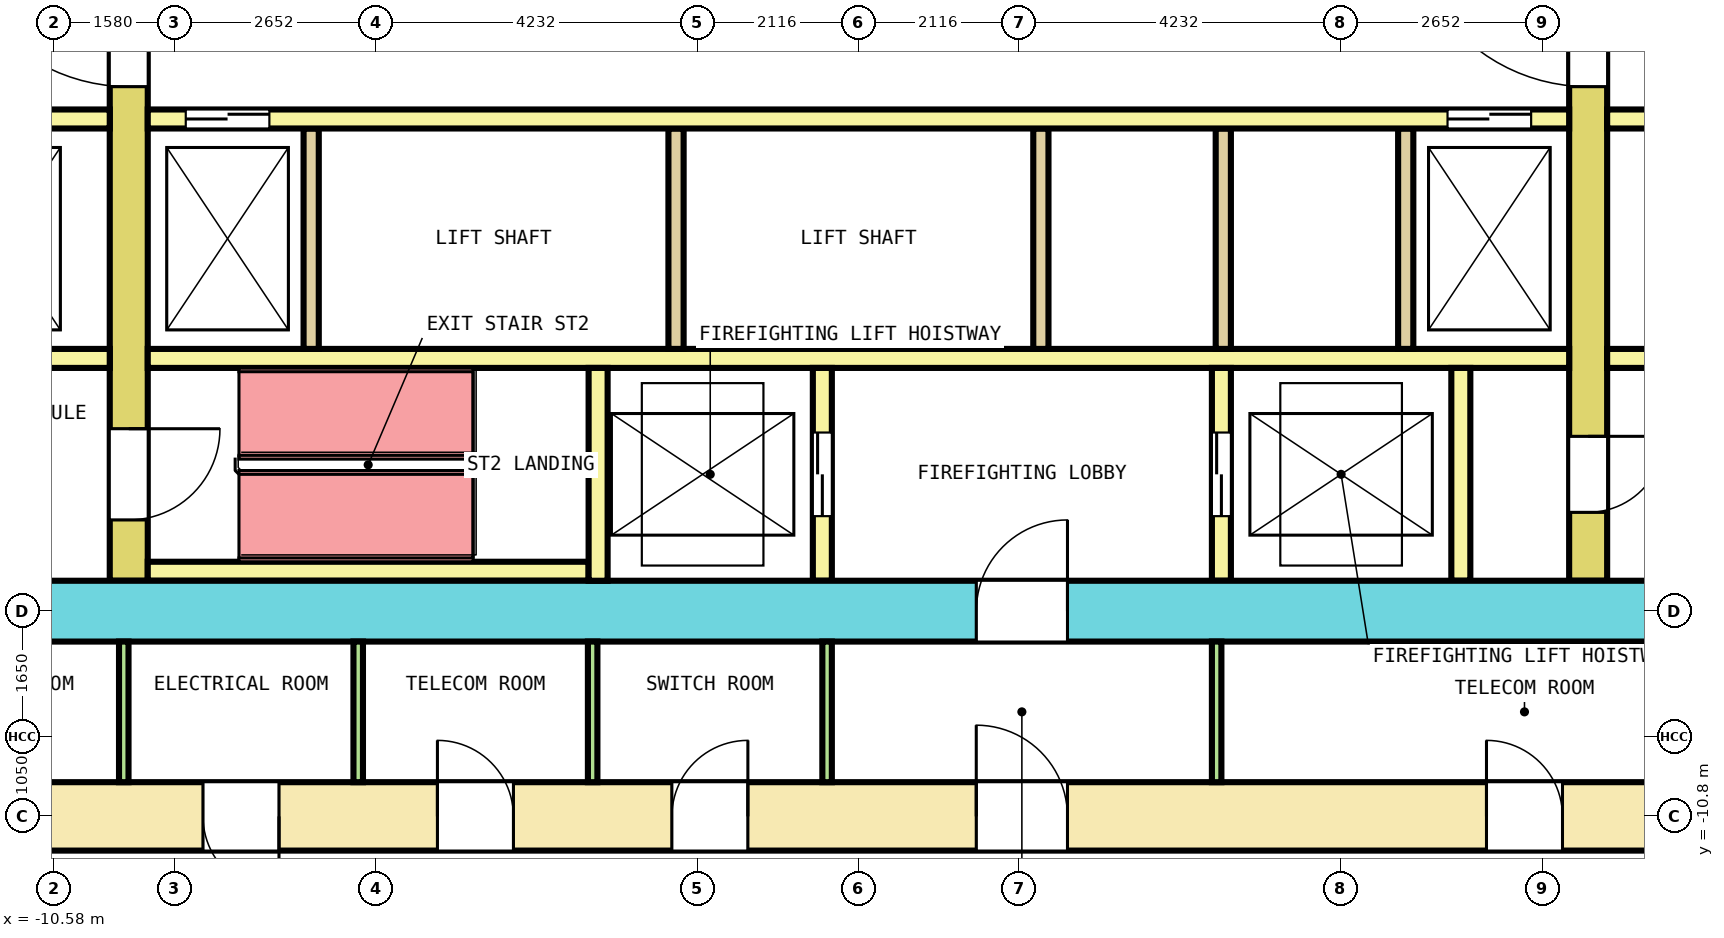
"""IFC4 building model, lengths in metres.
Left out: names, types, materials, properties, quantities, classifications, styles, units other than length and angle.
Written with IfcOpenShell. Run it as: python <this file> out.ifc"""

import sys

from ifc_helpers import new_model, si_unit, direction, frame, frame_2d, origin, place, context, subcontext, project, spatial, rectangle, extrude, element, fill, save


model = new_model("IFC4")
c1 = context("Model", 3, precision=1e-05, world=origin(), true_north=direction((0.0, 1.0)))
c2 = subcontext(c1, "Body", "Model", "MODEL_VIEW")
j1 = project(units=[si_unit("LENGTHUNIT", "METRE"), si_unit("PLANEANGLEUNIT", "RADIAN")], contexts=[c1])
p1 = place(None, origin())
s1 = spatial("IfcSite", under=j1, at=p1, CompositionType="ELEMENT")
p2 = place(p1, origin())
s2 = spatial("IfcBuilding", under=s1, at=p2, CompositionType="ELEMENT")
p3 = place(p2, frame((0.0, 0.0, 41.0)))
s3 = spatial("IfcBuildingStorey", under=s2, at=p3, CompositionType="ELEMENT", Elevation=41.0)
p4 = place(p3, frame((-13.65, -10.8, 0.0), z_axis=(0.0, 0.0, 1.0), x_axis=(1.0, 0.0, 0.0)))
e1 = element("IfcWall", 1, at=p4, inside=s3, PredefinedType="SHEAR", context=c2, shape_type="SweptSolid", body=[
    extrude(rectangle(XDim=27.3, YDim=0.9, at=frame_2d((13.65, 0.0))), origin(), (0.0, 0.0, 1.0), 4.1),
])
p5 = place(p4, frame((1.911, 0.0, 0.0)))
e2 = element("IfcOpeningElement", 2, at=p5, cuts=e1, PredefinedType="OPENING", context=c2, shape_type="SweptSolid", body=[
    extrude(rectangle(XDim=1.0, YDim=2.1, at=frame_2d((0.5, 1.05))), frame((0.0, 0.46, 0.0), z_axis=(0.0, -1.0, 0.0), x_axis=(1.0, 0.0, 0.0)), (0.0, 0.0, 1.0), 0.92),
])
p6 = place(p4, frame((5.027, 0.0, 0.0)))
e3 = element("IfcOpeningElement", 3, at=p6, cuts=e1, PredefinedType="OPENING", context=c2, shape_type="SweptSolid", body=[
    extrude(rectangle(XDim=1.0, YDim=2.1, at=frame_2d((0.5, 1.05))), frame((0.0, 0.46, 0.0), z_axis=(0.0, -1.0, 0.0), x_axis=(1.0, 0.0, 0.0)), (0.0, 0.0, 1.0), 0.92),
])
p7 = place(p4, frame((8.111, 0.0, 0.0)))
e4 = element("IfcOpeningElement", 4, at=p7, cuts=e1, PredefinedType="OPENING", context=c2, shape_type="SweptSolid", body=[
    extrude(rectangle(XDim=1.0, YDim=2.1, at=frame_2d((0.5, 1.05))), frame((0.0, 0.46, 0.0), z_axis=(0.0, -1.0, 0.0), x_axis=(1.0, 0.0, 0.0)), (0.0, 0.0, 1.0), 0.92),
])
p8 = place(p4, frame((11.195, 0.0, 0.0)))
e5 = element("IfcOpeningElement", 5, at=p8, cuts=e1, PredefinedType="OPENING", context=c2, shape_type="SweptSolid", body=[
    extrude(rectangle(XDim=1.0, YDim=2.1, at=frame_2d((0.5, 1.05))), frame((0.0, 0.46, 0.0), z_axis=(0.0, -1.0, 0.0), x_axis=(1.0, 0.0, 0.0)), (0.0, 0.0, 1.0), 0.92),
])
p9 = place(p4, frame((21.913, 0.0, 0.0)))
e6 = element("IfcOpeningElement", 6, at=p9, cuts=e1, PredefinedType="OPENING", context=c2, shape_type="SweptSolid", body=[
    extrude(rectangle(XDim=1.0, YDim=2.1, at=frame_2d((0.5, 1.05))), frame((0.0, 0.46, 0.0), z_axis=(0.0, -1.0, 0.0), x_axis=(1.0, 0.0, 0.0)), (0.0, 0.0, 1.0), 0.92),
])
p10 = place(p4, frame((15.2, 0.0, 0.0)))
e7 = element("IfcOpeningElement", 7, at=p10, cuts=e1, PredefinedType="OPENING", context=c2, shape_type="SweptSolid", body=[
    extrude(rectangle(XDim=1.2, YDim=2.1, at=frame_2d((0.6, 1.05))), frame((0.0, 0.46, 0.0), z_axis=(0.0, -1.0, 0.0), x_axis=(1.0, 0.0, 0.0)), (0.0, 0.0, 1.0), 0.92),
])
p11 = place(p3, frame((-12.75, -8.1, 0.0), z_axis=(0.0, 0.0, 1.0), x_axis=(1.0, 0.0, 0.0)))
e8 = element("IfcWall", 8, at=p11, inside=s3, PredefinedType="SHEAR", context=c2, shape_type="SweptSolid", body=[
    extrude(rectangle(XDim=25.5, YDim=0.8, at=frame_2d((12.75, 0.0))), origin(), (0.0, 0.0, 1.0), 4.1),
])
p12 = place(p11, frame((14.3, 0.0, 0.0)))
e9 = element("IfcOpeningElement", 9, at=p12, cuts=e8, PredefinedType="OPENING", context=c2, shape_type="SweptSolid", body=[
    extrude(rectangle(XDim=1.2, YDim=2.1, at=frame_2d((0.6, 1.05))), frame((0.0, 0.41, 0.0), z_axis=(0.0, -1.0, 0.0), x_axis=(1.0, 0.0, 0.0)), (0.0, 0.0, 1.0), 0.82),
])
p13 = place(p3, frame((-9.6, -7.7, 0.0), z_axis=(0.0, 0.0, 1.0), x_axis=(0.0, 1.0, 0.0)))
e10 = element("IfcWall", 10, at=p13, inside=s3, PredefinedType="SHEAR", context=c2, shape_type="SweptSolid", body=[
    extrude(rectangle(XDim=15.4, YDim=0.5, at=frame_2d((7.7, 0.0))), origin(), (0.0, 0.0, 1.0), 4.1),
])
p14 = place(p13, frame((6.5, 0.0, 0.0)))
e11 = element("IfcOpeningElement", 11, at=p14, cuts=e10, PredefinedType="OPENING", context=c2, shape_type="SweptSolid", body=[
    extrude(rectangle(XDim=2.4, YDim=2.1, at=frame_2d((1.2, 1.05))), frame((0.0, 0.26, 0.0), z_axis=(0.0, -1.0, 0.0), x_axis=(1.0, 0.0, 0.0)), (0.0, 0.0, 1.0), 0.52),
])
p15 = place(p13, frame((13.4, 0.0, 0.0)))
e12 = element("IfcOpeningElement", 12, at=p15, cuts=e10, PredefinedType="OPENING", context=c2, shape_type="SweptSolid", body=[
    extrude(rectangle(XDim=1.2, YDim=2.1, at=frame_2d((0.6, 1.05))), frame((0.0, 0.26, 0.0), z_axis=(0.0, -1.0, 0.0), x_axis=(1.0, 0.0, 0.0)), (0.0, 0.0, 1.0), 0.52),
])
p16 = place(p13, frame((0.8, 0.0, 0.0)))
e13 = element("IfcOpeningElement", 13, at=p16, cuts=e10, PredefinedType="OPENING", context=c2, shape_type="SweptSolid", body=[
    extrude(rectangle(XDim=1.2, YDim=2.1, at=frame_2d((0.6, 1.05))), frame((0.0, 0.26, 0.0), z_axis=(0.0, -1.0, 0.0), x_axis=(1.0, 0.0, 0.0)), (0.0, 0.0, 1.0), 0.52),
])
p17 = place(p3, frame((9.6, -7.7, 0.0), z_axis=(0.0, 0.0, 1.0), x_axis=(0.0, 1.0, 0.0)))
e14 = element("IfcWall", 14, at=p17, inside=s3, PredefinedType="SHEAR", context=c2, shape_type="SweptSolid", body=[
    extrude(rectangle(XDim=15.4, YDim=0.5, at=frame_2d((7.7, 0.0))), origin(), (0.0, 0.0, 1.0), 4.1),
])
p18 = place(p17, frame((6.5, 0.0, 0.0)))
e15 = element("IfcOpeningElement", 15, at=p18, cuts=e14, PredefinedType="OPENING", context=c2, shape_type="SweptSolid", body=[
    extrude(rectangle(XDim=2.4, YDim=2.1, at=frame_2d((1.2, 1.05))), frame((0.0, 0.26, 0.0), z_axis=(0.0, -1.0, 0.0), x_axis=(1.0, 0.0, 0.0)), (0.0, 0.0, 1.0), 0.52),
])
p19 = place(p17, frame((13.4, 0.0, 0.0)))
e16 = element("IfcOpeningElement", 16, at=p19, cuts=e14, PredefinedType="OPENING", context=c2, shape_type="SweptSolid", body=[
    extrude(rectangle(XDim=1.2, YDim=2.1, at=frame_2d((0.6, 1.05))), frame((0.0, 0.26, 0.0), z_axis=(0.0, -1.0, 0.0), x_axis=(1.0, 0.0, 0.0)), (0.0, 0.0, 1.0), 0.52),
])
p20 = place(p17, frame((0.9, 0.0, 0.0)))
e17 = element("IfcOpeningElement", 17, at=p20, cuts=e14, PredefinedType="OPENING", context=c2, shape_type="SweptSolid", body=[
    extrude(rectangle(XDim=1.0, YDim=2.1, at=frame_2d((0.5, 1.05))), frame((0.0, 0.26, 0.0), z_axis=(0.0, -1.0, 0.0), x_axis=(1.0, 0.0, 0.0)), (0.0, 0.0, 1.0), 0.52),
])
p21 = place(p3, frame((-12.75, -1.625, 0.0), z_axis=(0.0, 0.0, 1.0), x_axis=(1.0, 0.0, 0.0)))
e18 = element("IfcWall", 18, at=p21, inside=s3, PredefinedType="SOLIDWALL", context=c2, shape_type="SweptSolid", body=[
    extrude(rectangle(XDim=2.9, YDim=0.25, at=frame_2d((1.45, 0.0))), origin(), (0.0, 0.0, 1.0), 4.1),
])
p22 = place(p21, frame((0.9, 0.0, 0.0)))
e19 = element("IfcOpeningElement", 19, at=p22, cuts=e18, PredefinedType="OPENING", context=c2, shape_type="SweptSolid", body=[
    extrude(rectangle(XDim=1.1, YDim=2.1, at=frame_2d((0.55, 1.05))), frame((0.0, 0.135, 0.0), z_axis=(0.0, -1.0, 0.0), x_axis=(1.0, 0.0, 0.0)), (0.0, 0.0, 1.0), 0.27),
])
p23 = place(p3, frame((-9.35, -1.625, 0.0), z_axis=(0.0, 0.0, 1.0), x_axis=(1.0, 0.0, 0.0)))
e20 = element("IfcWall", 20, at=p23, inside=s3, PredefinedType="SOLIDWALL", context=c2, shape_type="SweptSolid", body=[
    extrude(rectangle(XDim=18.7, YDim=0.25, at=frame_2d((9.35, 0.0))), origin(), (0.0, 0.0, 1.0), 4.1),
])
p24 = place(p23, frame((0.5, 0.0, 0.0)))
e21 = element("IfcOpeningElement", 21, at=p24, cuts=e20, PredefinedType="OPENING", context=c2, shape_type="SweptSolid", body=[
    extrude(rectangle(XDim=1.1, YDim=2.1, at=frame_2d((0.55, 1.05))), frame((0.0, 0.135, 0.0), z_axis=(0.0, -1.0, 0.0), x_axis=(1.0, 0.0, 0.0)), (0.0, 0.0, 1.0), 0.27),
])
p25 = place(p23, frame((17.1, 0.0, 0.0)))
e22 = element("IfcOpeningElement", 22, at=p25, cuts=e20, PredefinedType="OPENING", context=c2, shape_type="SweptSolid", body=[
    extrude(rectangle(XDim=1.1, YDim=2.1, at=frame_2d((0.55, 1.05))), frame((0.0, 0.135, 0.0), z_axis=(0.0, -1.0, 0.0), x_axis=(1.0, 0.0, 0.0)), (0.0, 0.0, 1.0), 0.27),
])
p26 = place(p3, frame((9.85, -1.625, 0.0), z_axis=(0.0, 0.0, 1.0), x_axis=(1.0, 0.0, 0.0)))
e23 = element("IfcWall", 23, at=p26, inside=s3, PredefinedType="SOLIDWALL", context=c2, shape_type="SweptSolid", body=[
    extrude(rectangle(XDim=2.9, YDim=0.25, at=frame_2d((1.45, 0.0))), origin(), (0.0, 0.0, 1.0), 4.1),
])
p27 = place(p26, frame((0.9, 0.0, 0.0)))
e24 = element("IfcOpeningElement", 24, at=p27, cuts=e23, PredefinedType="OPENING", context=c2, shape_type="SweptSolid", body=[
    extrude(rectangle(XDim=1.1, YDim=2.1, at=frame_2d((0.55, 1.05))), frame((0.0, 0.135, 0.0), z_axis=(0.0, -1.0, 0.0), x_axis=(1.0, 0.0, 0.0)), (0.0, 0.0, 1.0), 0.27),
])
p28 = place(p3, frame((-12.75, -4.775, 0.0), z_axis=(0.0, 0.0, 1.0), x_axis=(1.0, 0.0, 0.0)))
e25 = element("IfcWall", 25, at=p28, inside=s3, PredefinedType="SOLIDWALL", context=c2, shape_type="SweptSolid", body=[
    extrude(rectangle(XDim=2.9, YDim=0.25, at=frame_2d((1.45, 0.0))), origin(), (0.0, 0.0, 1.0), 4.1),
])
p29 = place(p3, frame((-9.35, -4.775, 0.0), z_axis=(0.0, 0.0, 1.0), x_axis=(1.0, 0.0, 0.0)))
e26 = element("IfcWall", 26, at=p29, inside=s3, PredefinedType="SOLIDWALL", context=c2, shape_type="SweptSolid", body=[
    extrude(rectangle(XDim=18.7, YDim=0.25, at=frame_2d((9.35, 0.0))), origin(), (0.0, 0.0, 1.0), 4.1),
])
p30 = place(p3, frame((9.85, -4.775, 0.0), z_axis=(0.0, 0.0, 1.0), x_axis=(1.0, 0.0, 0.0)))
e27 = element("IfcWall", 27, at=p30, inside=s3, PredefinedType="SOLIDWALL", context=c2, shape_type="SweptSolid", body=[
    extrude(rectangle(XDim=2.9, YDim=0.25, at=frame_2d((1.45, 0.0))), origin(), (0.0, 0.0, 1.0), 4.1),
])
for number, where, z_axis, x_axis in (
    (28, (-7.2, -4.65, 0.0), (0.0, 0.0, 1.0), (0.0, 1.0, 0.0)),
    (29, (-2.4, -4.65, 0.0), (0.0, 0.0, 1.0), (0.0, 1.0, 0.0)),
    (30, (2.4, -4.65, 0.0), (0.0, 0.0, 1.0), (0.0, 1.0, 0.0)),
    (31, (4.8, -4.65, 0.0), (0.0, 0.0, 1.0), (0.0, 1.0, 0.0)),
    (32, (7.2, -4.65, 0.0), (0.0, 0.0, 1.0), (0.0, 1.0, 0.0)),
):
    element("IfcWall", number, at=place(p3, frame(where, z_axis=z_axis, x_axis=x_axis)), inside=s3, PredefinedType="SOLIDWALL", context=c2, shape_type="SweptSolid", body=[
        extrude(rectangle(XDim=2.9, YDim=0.2, at=frame_2d((1.45, 0.0))), origin(), (0.0, 0.0, 1.0), 4.1),
    ])
p31 = place(p3, frame((-9.35, -7.575, 0.0), z_axis=(0.0, 0.0, 1.0), x_axis=(1.0, 0.0, 0.0)))
e33 = element("IfcWall", 33, at=p31, inside=s3, PredefinedType="SOLIDWALL", context=c2, shape_type="SweptSolid", body=[
    extrude(rectangle(XDim=5.8, YDim=0.25, at=frame_2d((2.9, 0.0))), origin(), (0.0, 0.0, 1.0), 4.1),
])
p32 = place(p3, frame((-3.425, -7.7, 0.0), z_axis=(0.0, 0.0, 1.0), x_axis=(0.0, 1.0, 0.0)))
e34 = element("IfcWall", 34, at=p32, inside=s3, PredefinedType="SOLIDWALL", context=c2, shape_type="SweptSolid", body=[
    extrude(rectangle(XDim=2.8, YDim=0.25, at=frame_2d((1.4, 0.0))), origin(), (0.0, 0.0, 1.0), 4.1),
])
p33 = place(p3, frame((-0.475, -7.7, 0.0), z_axis=(0.0, 0.0, 1.0), x_axis=(0.0, 1.0, 0.0)))
e35 = element("IfcWall", 35, at=p33, inside=s3, PredefinedType="SOLIDWALL", context=c2, shape_type="SweptSolid", body=[
    extrude(rectangle(XDim=2.8, YDim=0.25, at=frame_2d((1.4, 0.0))), origin(), (0.0, 0.0, 1.0), 4.1),
])
p34 = place(p33, frame((0.85, 0.0, 0.0)))
e36 = element("IfcOpeningElement", 36, at=p34, cuts=e35, PredefinedType="OPENING", context=c2, shape_type="SweptSolid", body=[
    extrude(rectangle(XDim=1.1, YDim=2.1, at=frame_2d((0.55, 1.05))), frame((0.0, 0.135, 0.0), z_axis=(0.0, -1.0, 0.0), x_axis=(1.0, 0.0, 0.0)), (0.0, 0.0, 1.0), 0.27),
])
p35 = place(p3, frame((4.775, -7.7, 0.0), z_axis=(0.0, 0.0, 1.0), x_axis=(0.0, 1.0, 0.0)))
e37 = element("IfcWall", 37, at=p35, inside=s3, PredefinedType="SOLIDWALL", context=c2, shape_type="SweptSolid", body=[
    extrude(rectangle(XDim=2.8, YDim=0.25, at=frame_2d((1.4, 0.0))), origin(), (0.0, 0.0, 1.0), 4.1),
])
p36 = place(p35, frame((0.85, 0.0, 0.0)))
e38 = element("IfcOpeningElement", 38, at=p36, cuts=e37, PredefinedType="OPENING", context=c2, shape_type="SweptSolid", body=[
    extrude(rectangle(XDim=1.1, YDim=2.1, at=frame_2d((0.55, 1.05))), frame((0.0, 0.135, 0.0), z_axis=(0.0, -1.0, 0.0), x_axis=(1.0, 0.0, 0.0)), (0.0, 0.0, 1.0), 0.27),
])
p37 = place(p3, frame((7.925, -7.7, 0.0), z_axis=(0.0, 0.0, 1.0), x_axis=(0.0, 1.0, 0.0)))
e39 = element("IfcWall", 39, at=p37, inside=s3, PredefinedType="SOLIDWALL", context=c2, shape_type="SweptSolid", body=[
    extrude(rectangle(XDim=2.8, YDim=0.25, at=frame_2d((1.4, 0.0))), origin(), (0.0, 0.0, 1.0), 4.1),
])
for number, where, z_axis, x_axis in (
    (40, (-9.666, -10.35, 0.0), (0.0, 0.0, 1.0), (0.0, 1.0, 0.0)),
    (41, (-6.581, -10.35, 0.0), (0.0, 0.0, 1.0), (0.0, 1.0, 0.0)),
    (42, (-3.497, -10.35, 0.0), (0.0, 0.0, 1.0), (0.0, 1.0, 0.0)),
    (43, (-0.413, -10.35, 0.0), (0.0, 0.0, 1.0), (0.0, 1.0, 0.0)),
    (44, (4.712, -10.35, 0.0), (0.0, 0.0, 1.0), (0.0, 1.0, 0.0)),
):
    element("IfcWall", number, at=place(p3, frame(where, z_axis=z_axis, x_axis=x_axis)), inside=s3, PredefinedType="PARTITIONING", context=c2, shape_type="SweptSolid", body=[
        extrude(rectangle(XDim=1.85, YDim=0.125, at=frame_2d((0.925, 0.0))), origin(), (0.0, 0.0, 1.0), 4.1),
    ])
p38 = place(p24, origin())
e45 = element("IfcDoor", 45, at=p38, inside=s3, OperationType="DOUBLE_DOOR_SLIDING", PredefinedType="DOOR", context=c2, shape_type="SweptSolid", body=[
    extrude(rectangle(XDim=1.1, YDim=2.1, at=frame_2d((0.55, 1.05))), frame((0.0, 0.075, 0.0), z_axis=(0.0, -1.0, 0.0), x_axis=(1.0, 0.0, 0.0)), (0.0, 0.0, 1.0), 0.15),
])
fill(e21, e45)
p39 = place(p25, origin())
e46 = element("IfcDoor", 46, at=p39, inside=s3, OperationType="DOUBLE_DOOR_SLIDING", PredefinedType="DOOR", context=c2, shape_type="SweptSolid", body=[
    extrude(rectangle(XDim=1.1, YDim=2.1, at=frame_2d((0.55, 1.05))), frame((0.0, 0.075, 0.0), z_axis=(0.0, -1.0, 0.0), x_axis=(1.0, 0.0, 0.0)), (0.0, 0.0, 1.0), 0.15),
])
fill(e22, e46)
p40 = place(p34, origin())
e47 = element("IfcDoor", 47, at=p40, inside=s3, OperationType="DOUBLE_DOOR_SLIDING", PredefinedType="DOOR", context=c2, shape_type="SweptSolid", body=[
    extrude(rectangle(XDim=1.1, YDim=2.1, at=frame_2d((0.55, 1.05))), frame((0.0, 0.075, 0.0), z_axis=(0.0, -1.0, 0.0), x_axis=(1.0, 0.0, 0.0)), (0.0, 0.0, 1.0), 0.15),
])
fill(e36, e47)
p41 = place(p36, origin())
e48 = element("IfcDoor", 48, at=p41, inside=s3, OperationType="DOUBLE_DOOR_SLIDING", PredefinedType="DOOR", context=c2, shape_type="SweptSolid", body=[
    extrude(rectangle(XDim=1.1, YDim=2.1, at=frame_2d((0.55, 1.05))), frame((0.0, 0.075, 0.0), z_axis=(0.0, -1.0, 0.0), x_axis=(1.0, 0.0, 0.0)), (0.0, 0.0, 1.0), 0.15),
])
fill(e38, e48)
p42 = place(p14, origin())
e49 = element("IfcDoor", 49, at=p42, inside=s3, OperationType="DOUBLE_DOOR_SINGLE_SWING", PredefinedType="DOOR", context=c2, shape_type="SweptSolid", body=[
    extrude(rectangle(XDim=2.4, YDim=2.1, at=frame_2d((1.2, 1.05))), frame((0.0, 0.2, 0.0), z_axis=(0.0, -1.0, 0.0), x_axis=(1.0, 0.0, 0.0)), (0.0, 0.0, 1.0), 0.4),
])
fill(e11, e49)
p43 = place(p18, origin())
e50 = element("IfcDoor", 50, at=p43, inside=s3, OperationType="DOUBLE_DOOR_SINGLE_SWING", PredefinedType="DOOR", context=c2, shape_type="SweptSolid", body=[
    extrude(rectangle(XDim=2.4, YDim=2.1, at=frame_2d((1.2, 1.05))), frame((0.0, 0.2, 0.0), z_axis=(0.0, -1.0, 0.0), x_axis=(1.0, 0.0, 0.0)), (0.0, 0.0, 1.0), 0.4),
])
fill(e15, e50)
p44 = place(p16, origin())
e51 = element("IfcDoor", 51, at=p44, inside=s3, OperationType="SINGLE_SWING_RIGHT", PredefinedType="DOOR", context=c2, shape_type="SweptSolid", body=[
    extrude(rectangle(XDim=1.2, YDim=2.1, at=frame_2d((0.6, 1.05))), frame((0.0, 0.2, 0.0), z_axis=(0.0, -1.0, 0.0), x_axis=(1.0, 0.0, 0.0)), (0.0, 0.0, 1.0), 0.4),
])
fill(e13, e51)
p45 = place(p12, origin())
e52 = element("IfcDoor", 52, at=p45, inside=s3, OperationType="SINGLE_SWING_RIGHT", PredefinedType="DOOR", context=c2, shape_type="SweptSolid", body=[
    extrude(rectangle(XDim=1.2, YDim=2.1, at=frame_2d((0.6, 1.05))), frame((0.0, 0.3, 0.0), z_axis=(0.0, -1.0, 0.0), x_axis=(1.0, 0.0, 0.0)), (0.0, 0.0, 1.0), 0.6),
])
fill(e9, e52)
p46 = place(p20, origin())
e53 = element("IfcDoor", 53, at=p46, inside=s3, OperationType="SINGLE_SWING_RIGHT", PredefinedType="DOOR", context=c2, shape_type="SweptSolid", body=[
    extrude(rectangle(XDim=1.0, YDim=2.1, at=frame_2d((0.5, 1.05))), frame((0.0, 0.2, 0.0), z_axis=(0.0, -1.0, 0.0), x_axis=(1.0, 0.0, 0.0)), (0.0, 0.0, 1.0), 0.4),
])
fill(e17, e53)
p47 = place(p6, origin())
e54 = element("IfcDoor", 54, at=p47, inside=s3, OperationType="SINGLE_SWING_RIGHT", PredefinedType="DOOR", context=c2, shape_type="SweptSolid", body=[
    extrude(rectangle(XDim=1.0, YDim=2.1, at=frame_2d((0.5, 1.05))), frame((0.0, 0.3, 0.0), z_axis=(0.0, -1.0, 0.0), x_axis=(1.0, 0.0, 0.0)), (0.0, 0.0, 1.0), 0.6),
])
fill(e3, e54)
p48 = place(p7, origin())
e55 = element("IfcDoor", 55, at=p48, inside=s3, OperationType="SINGLE_SWING_LEFT", PredefinedType="DOOR", context=c2, shape_type="SweptSolid", body=[
    extrude(rectangle(XDim=1.0, YDim=2.1, at=frame_2d((0.5, 1.05))), frame((0.0, 0.3, 0.0), z_axis=(0.0, -1.0, 0.0), x_axis=(1.0, 0.0, 0.0)), (0.0, 0.0, 1.0), 0.6),
])
fill(e4, e55)
p49 = place(p8, origin())
e56 = element("IfcDoor", 56, at=p49, inside=s3, OperationType="SINGLE_SWING_RIGHT", PredefinedType="DOOR", context=c2, shape_type="SweptSolid", body=[
    extrude(rectangle(XDim=1.0, YDim=2.1, at=frame_2d((0.5, 1.05))), frame((0.0, 0.3, 0.0), z_axis=(0.0, -1.0, 0.0), x_axis=(1.0, 0.0, 0.0)), (0.0, 0.0, 1.0), 0.6),
])
fill(e5, e56)
p50 = place(p9, origin())
e57 = element("IfcDoor", 57, at=p50, inside=s3, OperationType="SINGLE_SWING_LEFT", PredefinedType="DOOR", context=c2, shape_type="SweptSolid", body=[
    extrude(rectangle(XDim=1.0, YDim=2.1, at=frame_2d((0.5, 1.05))), frame((0.0, 0.3, 0.0), z_axis=(0.0, -1.0, 0.0), x_axis=(1.0, 0.0, 0.0)), (0.0, 0.0, 1.0), 0.6),
])
fill(e6, e57)
p51 = place(p10, origin())
e58 = element("IfcDoor", 58, at=p51, inside=s3, OperationType="SINGLE_SWING_RIGHT", PredefinedType="DOOR", context=c2, shape_type="SweptSolid", body=[
    extrude(rectangle(XDim=1.2, YDim=2.1, at=frame_2d((0.6, 1.05))), frame((0.0, 0.3, 0.0), z_axis=(0.0, -1.0, 0.0), x_axis=(1.0, 0.0, 0.0)), (0.0, 0.0, 1.0), 0.6),
])
fill(e7, e58)
save(model, sys.argv[1])
